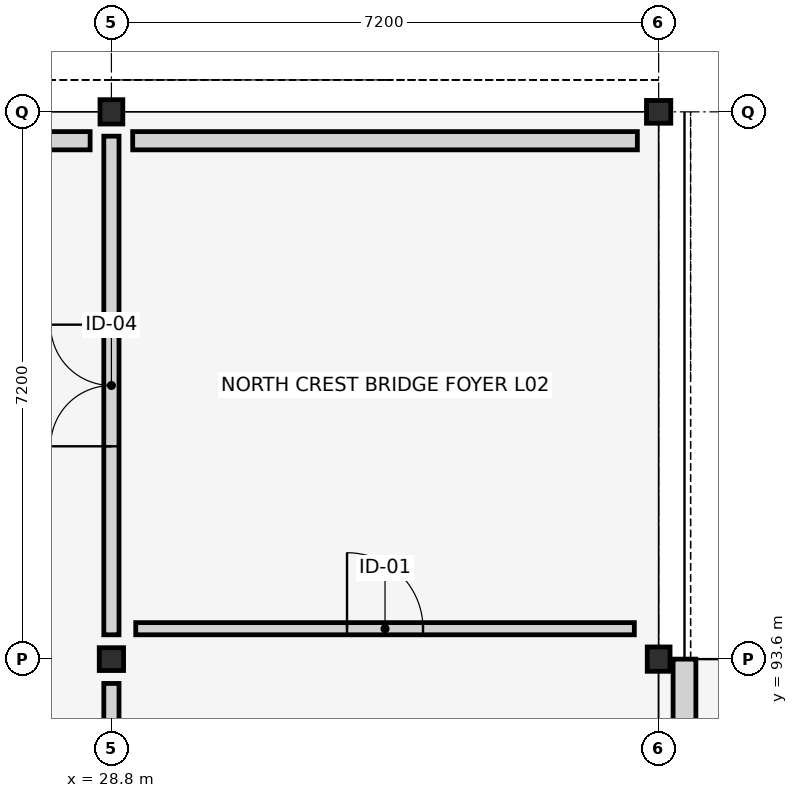
"""IFC4 building model, lengths in metres.
Left out: names, types, materials, properties, quantities, classifications, styles, units other than length and angle.
Written with IfcOpenShell. Run it as: python <this file> out.ifc"""

import sys

from ifc_helpers import new_model, si_unit, direction, frame, frame_2d, origin, origin_2d, place, context, subcontext, project, spatial, rectangle, i_section, extrude, element, fill, save


model = new_model("IFC4")
c1 = context("Model", 3, precision=1e-05, world=origin(), true_north=direction((0.0, 1.0)))
c2 = subcontext(c1, "Body", "Model", "MODEL_VIEW")
j1 = project(units=[si_unit("LENGTHUNIT", "METRE"), si_unit("PLANEANGLEUNIT", "RADIAN")], contexts=[c1])
p1 = place(None, origin())
s1 = spatial("IfcSite", under=j1, at=p1, CompositionType="ELEMENT")
p2 = place(p1, origin())
s2 = spatial("IfcBuilding", under=s1, at=p2, CompositionType="ELEMENT")
p3 = place(p2, frame((0.0, 0.0, 8.7)))
s3 = spatial("IfcBuildingStorey", under=s2, at=p3, CompositionType="ELEMENT", Elevation=8.7)
for number, where, z_axis, x_axis in (
    (1, (28.8, 93.6, 0.0), (0.0, 0.0, 1.0), (0.0, 1.0, 0.0)),
    (2, (28.8, 100.8, 0.0), (0.0, 0.0, 1.0), (1.0, 0.0, 0.0)),
    (3, (36.0, 93.6, 0.0), (0.0, 0.0, 1.0), (1.0, 0.0, 0.0)),
    (4, (36.0, 100.8, 0.0), (0.0, 0.0, 1.0), (0.0, 1.0, 0.0)),
):
    element("IfcColumn", number, at=place(p3, frame(where, z_axis=z_axis, x_axis=x_axis)), inside=s3, PredefinedType="COLUMN", context=c2, shape_type="SweptSolid", body=[
        extrude(i_section(OverallWidth=0.3, OverallDepth=0.32, WebThickness=0.011, FlangeThickness=0.021, FilletRadius=0.027, at=origin_2d()), origin(), (0.0, 0.0, 1.0), 4.2),
    ])
p4 = place(p3, frame((36.34, 86.4, 0.0), z_axis=(0.0, 0.0, 1.0), x_axis=(0.0, 1.0, 0.0)))
e5 = element("IfcWall", 5, at=p4, inside=s3, PredefinedType="STANDARD", context=c2, shape_type="SweptSolid", body=[
    extrude(rectangle(XDim=7.2, YDim=0.3, at=frame_2d((3.6, 0.0))), origin(), (0.0, 0.0, 1.0), 3.65),
])
p5 = place(p4, frame((2.65, 0.0, 0.0)))
e6 = element("IfcOpeningElement", 6, at=p5, cuts=e5, PredefinedType="OPENING", context=c2, shape_type="SweptSolid", body=[
    extrude(rectangle(XDim=1.9, YDim=2.45, at=frame_2d((0.95, 1.225))), frame((0.0, 0.16, 0.0), z_axis=(0.0, -1.0, 0.0), x_axis=(1.0, 0.0, 0.0)), (0.0, 0.0, 1.0), 0.32),
])
p6 = place(p3, frame((28.52, 100.42, 0.0), z_axis=(0.0, 0.0, 1.0), x_axis=(-1.0, 0.0, 0.0)))
e7 = element("IfcWall", 7, at=p6, inside=s3, PredefinedType="STANDARD", context=c2, shape_type="SweptSolid", body=[
    extrude(rectangle(XDim=6.64, YDim=0.24, at=frame_2d((3.32, 0.0))), origin(), (0.0, 0.0, 1.0), 3.56),
])
p7 = place(p3, frame((35.72, 100.42, 0.0), z_axis=(0.0, 0.0, 1.0), x_axis=(-1.0, 0.0, 0.0)))
e8 = element("IfcWall", 8, at=p7, inside=s3, PredefinedType="STANDARD", context=c2, shape_type="SweptSolid", body=[
    extrude(rectangle(XDim=6.64, YDim=0.24, at=frame_2d((3.32, 0.0))), origin(), (0.0, 0.0, 1.0), 3.56),
])
p8 = place(p3, frame((28.8, 72.32, 0.0), z_axis=(0.0, 0.0, 1.0), x_axis=(0.0, 1.0, 0.0)))
e9 = element("IfcWall", 9, at=p8, inside=s3, PredefinedType="PARTITIONING", context=c2, shape_type="SweptSolid", body=[
    extrude(rectangle(XDim=20.96, YDim=0.2, at=frame_2d((10.48, 0.0))), origin(), (0.0, 0.0, 1.0), 3.15),
])
p9 = place(p8, frame((9.68, 0.0, 0.0)))
e10 = element("IfcOpeningElement", 10, at=p9, cuts=e9, PredefinedType="OPENING", context=c2, shape_type="SweptSolid", body=[
    extrude(rectangle(XDim=1.6, YDim=2.35, at=frame_2d((0.8, 1.175))), frame((0.0, 0.11, 0.0), z_axis=(0.0, -1.0, 0.0), x_axis=(1.0, 0.0, 0.0)), (0.0, 0.0, 1.0), 0.22),
])
p10 = place(p3, frame((28.8, 93.92, 0.0), z_axis=(0.0, 0.0, 1.0), x_axis=(0.0, 1.0, 0.0)))
e11 = element("IfcWall", 11, at=p10, inside=s3, PredefinedType="PARTITIONING", context=c2, shape_type="SweptSolid", body=[
    extrude(rectangle(XDim=6.56, YDim=0.2, at=frame_2d((3.28, 0.0))), origin(), (0.0, 0.0, 1.0), 3.15),
])
p11 = place(p10, frame((2.48, 0.0, 0.0)))
e12 = element("IfcOpeningElement", 12, at=p11, cuts=e11, PredefinedType="OPENING", context=c2, shape_type="SweptSolid", body=[
    extrude(rectangle(XDim=1.6, YDim=2.35, at=frame_2d((0.8, 1.175))), frame((0.0, 0.11, 0.0), z_axis=(0.0, -1.0, 0.0), x_axis=(1.0, 0.0, 0.0)), (0.0, 0.0, 1.0), 0.22),
])
p12 = place(p3, frame((29.12, 94.0, 0.0), z_axis=(0.0, 0.0, 1.0), x_axis=(1.0, 0.0, 0.0)))
e13 = element("IfcWall", 13, at=p12, inside=s3, PredefinedType="PARTITIONING", context=c2, shape_type="SweptSolid", body=[
    extrude(rectangle(XDim=6.56, YDim=0.16, at=frame_2d((3.28, 0.0))), origin(), (0.0, 0.0, 1.0), 3.15),
])
p13 = place(p12, frame((2.78, 0.0, 0.0)))
e14 = element("IfcOpeningElement", 14, at=p13, cuts=e13, PredefinedType="OPENING", context=c2, shape_type="SweptSolid", body=[
    extrude(rectangle(XDim=1.0, YDim=2.15, at=frame_2d((0.5, 1.075))), frame((0.0, 0.09, 0.0), z_axis=(0.0, -1.0, 0.0), x_axis=(1.0, 0.0, 0.0)), (0.0, 0.0, 1.0), 0.18),
])
p14 = place(p11, origin())
e15 = element("IfcDoor", 15, at=p14, inside=s3, OperationType="DOUBLE_DOOR_SINGLE_SWING", PredefinedType="DOOR", context=c2, shape_type="SweptSolid", body=[
    extrude(rectangle(XDim=1.6, YDim=2.35, at=frame_2d((0.8, 1.175))), frame((0.0, 0.025, 0.0), z_axis=(0.0, -1.0, 0.0), x_axis=(1.0, 0.0, 0.0)), (0.0, 0.0, 1.0), 0.05),
])
fill(e12, e15)
p15 = place(p13, origin())
e16 = element("IfcDoor", 16, at=p15, inside=s3, OperationType="SINGLE_SWING_LEFT", PredefinedType="DOOR", context=c2, shape_type="SweptSolid", body=[
    extrude(rectangle(XDim=1.0, YDim=2.15, at=frame_2d((0.5, 1.075))), frame((0.0, 0.025, 0.0), z_axis=(0.0, -1.0, 0.0), x_axis=(1.0, 0.0, 0.0)), (0.0, 0.0, 1.0), 0.05),
])
fill(e14, e16)
save(model, sys.argv[1])
